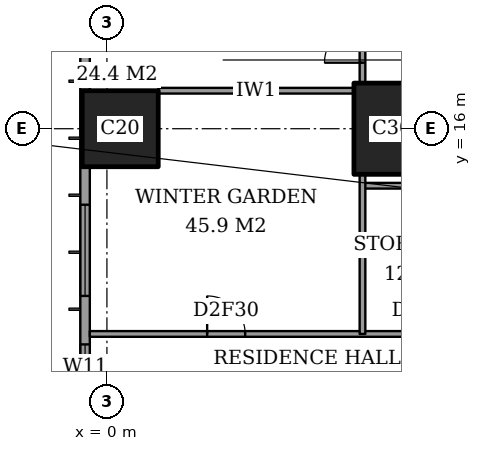
"""IFC4 building model, lengths in metres.
Left out: names, types, materials, properties, quantities, classifications, styles, units other than length and angle.
Written with IfcOpenShell. Run it as: python <this file> out.ifc"""

import sys

from ifc_helpers import new_model, si_unit, direction, frame, frame_2d, origin, origin_2d, place, context, subcontext, project, spatial, rectangle, extrude, element, fill, save


model = new_model("IFC4")
c1 = context("Model", 3, precision=1e-05, world=origin(), true_north=direction((0.0, 1.0)))
c2 = subcontext(c1, "Body", "Model", "MODEL_VIEW")
j1 = project(units=[si_unit("LENGTHUNIT", "METRE"), si_unit("PLANEANGLEUNIT", "RADIAN")], contexts=[c1])
p1 = place(None, origin())
s1 = spatial("IfcSite", under=j1, at=p1, CompositionType="ELEMENT")
p2 = place(p1, origin())
s2 = spatial("IfcBuilding", under=s1, at=p2, CompositionType="ELEMENT")
p3 = place(p2, frame((0.0, 0.0, 117.8)))
s3 = spatial("IfcBuildingStorey", under=s2, at=p3, CompositionType="ELEMENT", Elevation=117.8)
p4 = place(p3, frame((0.35, 16.0, 0.0), z_axis=(0.0, 0.0, 1.0), x_axis=(1.0, 0.0, 0.0)))
e1 = element("IfcColumn", 1, at=p4, inside=s3, PredefinedType="COLUMN", context=c2, shape_type="SweptSolid", body=[
    extrude(rectangle(XDim=2.0, YDim=2.0, at=origin_2d()), origin(), (0.0, 0.0, 1.0), 3.6),
])
p5 = place(p3, frame((8.0, 16.0, 0.0), z_axis=(0.0, 0.0, 1.0), x_axis=(1.0, 0.0, 0.0)))
e2 = element("IfcColumn", 2, at=p5, inside=s3, PredefinedType="COLUMN", context=c2, shape_type="SweptSolid", body=[
    extrude(rectangle(XDim=3.0, YDim=2.4, at=origin_2d()), origin(), (0.0, 0.0, 1.0), 3.6),
])
p6 = place(p3, frame((-0.575, 44.825, 0.0), z_axis=(0.0, 0.0, 1.0), x_axis=(0.0, -1.0, 0.0)))
e3 = element("IfcWall", 3, at=p6, inside=s3, PredefinedType="SOLIDWALL", context=c2, shape_type="SweptSolid", body=[
    extrude(rectangle(XDim=41.65, YDim=0.25, at=frame_2d((20.825, 0.0))), origin(), (0.0, 0.0, 1.0), 3.6),
])
p7 = place(p6, frame((0.775, 0.0, 0.4)))
e4 = element("IfcOpeningElement", 4, at=p7, cuts=e3, PredefinedType="OPENING", context=c2, shape_type="SweptSolid", body=[
    extrude(rectangle(XDim=2.4, YDim=2.2, at=frame_2d((1.2, 1.1))), frame((0.0, 0.135, 0.0), z_axis=(0.0, -1.0, 0.0), x_axis=(1.0, 0.0, 0.0)), (0.0, 0.0, 1.0), 0.27),
])
p8 = place(p6, frame((6.1, 0.0, 0.4)))
e5 = element("IfcOpeningElement", 5, at=p8, cuts=e3, PredefinedType="OPENING", context=c2, shape_type="SweptSolid", body=[
    extrude(rectangle(XDim=1.2, YDim=2.2, at=frame_2d((0.6, 1.1))), frame((0.0, 0.135, 0.0), z_axis=(0.0, -1.0, 0.0), x_axis=(1.0, 0.0, 0.0)), (0.0, 0.0, 1.0), 0.27),
])
p9 = place(p6, frame((8.225, 0.0, 0.4)))
e6 = element("IfcOpeningElement", 6, at=p9, cuts=e3, PredefinedType="OPENING", context=c2, shape_type="SweptSolid", body=[
    extrude(rectangle(XDim=2.4, YDim=2.2, at=frame_2d((1.2, 1.1))), frame((0.0, 0.135, 0.0), z_axis=(0.0, -1.0, 0.0), x_axis=(1.0, 0.0, 0.0)), (0.0, 0.0, 1.0), 0.27),
])
p10 = place(p6, frame((15.625, 0.0, 0.4)))
e7 = element("IfcOpeningElement", 7, at=p10, cuts=e3, PredefinedType="OPENING", context=c2, shape_type="SweptSolid", body=[
    extrude(rectangle(XDim=2.4, YDim=2.2, at=frame_2d((1.2, 1.1))), frame((0.0, 0.135, 0.0), z_axis=(0.0, -1.0, 0.0), x_axis=(1.0, 0.0, 0.0)), (0.0, 0.0, 1.0), 0.27),
])
p11 = place(p6, frame((23.625, 0.0, 0.4)))
e8 = element("IfcOpeningElement", 8, at=p11, cuts=e3, PredefinedType="OPENING", context=c2, shape_type="SweptSolid", body=[
    extrude(rectangle(XDim=2.4, YDim=2.2, at=frame_2d((1.2, 1.1))), frame((0.0, 0.135, 0.0), z_axis=(0.0, -1.0, 0.0), x_axis=(1.0, 0.0, 0.0)), (0.0, 0.0, 1.0), 0.27),
])
p12 = place(p6, frame((30.825, 0.0, 0.4)))
e9 = element("IfcOpeningElement", 9, at=p12, cuts=e3, PredefinedType="OPENING", context=c2, shape_type="SweptSolid", body=[
    extrude(rectangle(XDim=2.4, YDim=2.2, at=frame_2d((1.2, 1.1))), frame((0.0, 0.135, 0.0), z_axis=(0.0, -1.0, 0.0), x_axis=(1.0, 0.0, 0.0)), (0.0, 0.0, 1.0), 0.27),
])
p13 = place(p6, frame((34.5, 0.0, 0.4)))
e10 = element("IfcOpeningElement", 10, at=p13, cuts=e3, PredefinedType="OPENING", context=c2, shape_type="SweptSolid", body=[
    extrude(rectangle(XDim=1.2, YDim=2.2, at=frame_2d((0.6, 1.1))), frame((0.0, 0.135, 0.0), z_axis=(0.0, -1.0, 0.0), x_axis=(1.0, 0.0, 0.0)), (0.0, 0.0, 1.0), 0.27),
])
p14 = place(p6, frame((38.475, 0.0, 0.4)))
e11 = element("IfcOpeningElement", 11, at=p14, cuts=e3, PredefinedType="OPENING", context=c2, shape_type="SweptSolid", body=[
    extrude(rectangle(XDim=2.4, YDim=2.2, at=frame_2d((1.2, 1.1))), frame((0.0, 0.135, 0.0), z_axis=(0.0, -1.0, 0.0), x_axis=(1.0, 0.0, 0.0)), (0.0, 0.0, 1.0), 0.27),
])
p15 = place(p3, frame((-0.45, 10.6, 0.0), z_axis=(0.0, 0.0, 1.0), x_axis=(1.0, 0.0, 0.0)))
e12 = element("IfcWall", 12, at=p15, inside=s3, PredefinedType="PARTITIONING", context=c2, shape_type="SweptSolid", body=[
    extrude(rectangle(XDim=25.011, YDim=0.15, at=frame_2d((12.505, 0.0))), origin(), (0.0, 0.0, 1.0), 3.35),
])
p16 = place(p15, frame((13.25, 0.0, 0.0)))
e13 = element("IfcOpeningElement", 13, at=p16, cuts=e12, PredefinedType="OPENING", context=c2, shape_type="SweptSolid", body=[
    extrude(rectangle(XDim=1.0, YDim=2.1, at=frame_2d((0.5, 1.05))), frame((0.0, 0.085, 0.0), z_axis=(0.0, -1.0, 0.0), x_axis=(1.0, 0.0, 0.0)), (0.0, 0.0, 1.0), 0.17),
])
p17 = place(p15, frame((3.087, 0.0, 0.0)))
e14 = element("IfcOpeningElement", 14, at=p17, cuts=e12, PredefinedType="OPENING", context=c2, shape_type="SweptSolid", body=[
    extrude(rectangle(XDim=1.0, YDim=2.1, at=frame_2d((0.5, 1.05))), frame((0.0, 0.085, 0.0), z_axis=(0.0, -1.0, 0.0), x_axis=(1.0, 0.0, 0.0)), (0.0, 0.0, 1.0), 0.17),
])
p18 = place(p15, frame((8.363, 0.0, 0.0)))
e15 = element("IfcOpeningElement", 15, at=p18, cuts=e12, PredefinedType="OPENING", context=c2, shape_type="SweptSolid", body=[
    extrude(rectangle(XDim=0.9, YDim=2.1, at=frame_2d((0.45, 1.05))), frame((0.0, 0.085, 0.0), z_axis=(0.0, -1.0, 0.0), x_axis=(1.0, 0.0, 0.0)), (0.0, 0.0, 1.0), 0.17),
])
p19 = place(p15, frame((11.05, 0.0, 0.0)))
e16 = element("IfcOpeningElement", 16, at=p19, cuts=e12, PredefinedType="OPENING", context=c2, shape_type="SweptSolid", body=[
    extrude(rectangle(XDim=1.0, YDim=2.1, at=frame_2d((0.5, 1.05))), frame((0.0, 0.085, 0.0), z_axis=(0.0, -1.0, 0.0), x_axis=(1.0, 0.0, 0.0)), (0.0, 0.0, 1.0), 0.17),
])
p20 = place(p15, frame((16.15, 0.0, 0.0)))
e17 = element("IfcOpeningElement", 17, at=p20, cuts=e12, PredefinedType="OPENING", context=c2, shape_type="SweptSolid", body=[
    extrude(rectangle(XDim=1.0, YDim=2.1, at=frame_2d((0.5, 1.05))), frame((0.0, 0.085, 0.0), z_axis=(0.0, -1.0, 0.0), x_axis=(1.0, 0.0, 0.0)), (0.0, 0.0, 1.0), 0.17),
])
p21 = place(p15, frame((21.175, 0.0, 0.0)))
e18 = element("IfcOpeningElement", 18, at=p21, cuts=e12, PredefinedType="OPENING", context=c2, shape_type="SweptSolid", body=[
    extrude(rectangle(XDim=1.0, YDim=2.1, at=frame_2d((0.5, 1.05))), frame((0.0, 0.085, 0.0), z_axis=(0.0, -1.0, 0.0), x_axis=(1.0, 0.0, 0.0)), (0.0, 0.0, 1.0), 0.17),
])
p22 = place(p3, frame((6.725, 14.5, 0.0), z_axis=(0.0, 0.0, 1.0), x_axis=(1.0, 0.0, 0.0)))
e19 = element("IfcWall", 19, at=p22, inside=s3, PredefinedType="PARTITIONING", context=c2, shape_type="SweptSolid", body=[
    extrude(rectangle(XDim=3.275, YDim=0.15, at=frame_2d((1.637, 0.0))), origin(), (0.0, 0.0, 1.0), 3.35),
])
p23 = place(p3, frame((1.35, 17.0, 0.0), z_axis=(0.0, 0.0, 1.0), x_axis=(1.0, 0.0, 0.0)))
e20 = element("IfcWall", 20, at=p23, inside=s3, PredefinedType="PARTITIONING", context=c2, shape_type="SweptSolid", body=[
    extrude(rectangle(XDim=5.15, YDim=0.15, at=frame_2d((2.575, 0.0))), origin(), (0.0, 0.0, 1.0), 3.35),
])
p24 = place(p3, frame((6.725, 10.6, 0.0), z_axis=(0.0, 0.0, 1.0), x_axis=(0.0, 1.0, 0.0)))
e21 = element("IfcWall", 21, at=p24, inside=s3, PredefinedType="PARTITIONING", context=c2, shape_type="SweptSolid", body=[
    extrude(rectangle(XDim=4.2, YDim=0.15, at=frame_2d((2.1, 0.0))), origin(), (0.0, 0.0, 1.0), 3.35),
])
p25 = place(p3, frame((6.725, 17.2, 0.0), z_axis=(0.0, 0.0, 1.0), x_axis=(0.0, 1.0, 0.0)))
e22 = element("IfcWall", 22, at=p25, inside=s3, PredefinedType="PARTITIONING", context=c2, shape_type="SweptSolid", body=[
    extrude(rectangle(XDim=2.45, YDim=0.15, at=frame_2d((1.225, 0.0))), origin(), (0.0, 0.0, 1.0), 3.35),
])
p26 = place(p25, frame((0.538, 0.0, 0.0)))
e23 = element("IfcOpeningElement", 23, at=p26, cuts=e22, PredefinedType="OPENING", context=c2, shape_type="SweptSolid", body=[
    extrude(rectangle(XDim=1.0, YDim=2.1, at=frame_2d((0.5, 1.05))), frame((0.0, 0.085, 0.0), z_axis=(0.0, -1.0, 0.0), x_axis=(1.0, 0.0, 0.0)), (0.0, 0.0, 1.0), 0.17),
])
p27 = place(p12, origin())
e24 = element("IfcWindow", 24, at=p27, inside=s3, PartitioningType="SINGLE_PANEL", PredefinedType="WINDOW", context=c2, shape_type="SweptSolid", body=[
    extrude(rectangle(XDim=2.4, YDim=2.2, at=frame_2d((1.2, 1.1))), frame((0.0, 0.03, 0.0), z_axis=(0.0, -1.0, 0.0), x_axis=(1.0, 0.0, 0.0)), (0.0, 0.0, 1.0), 0.06),
])
fill(e9, e24)
p28 = place(p13, origin())
e25 = element("IfcWindow", 25, at=p28, inside=s3, PartitioningType="SINGLE_PANEL", PredefinedType="WINDOW", context=c2, shape_type="SweptSolid", body=[
    extrude(rectangle(XDim=1.2, YDim=2.2, at=frame_2d((0.6, 1.1))), frame((0.0, 0.03, 0.0), z_axis=(0.0, -1.0, 0.0), x_axis=(1.0, 0.0, 0.0)), (0.0, 0.0, 1.0), 0.06),
])
fill(e10, e25)
p29 = place(p17, origin())
e26 = element("IfcDoor", 26, at=p29, inside=s3, OperationType="SINGLE_SWING_RIGHT", PredefinedType="DOOR", context=c2, shape_type="SweptSolid", body=[
    extrude(rectangle(XDim=1.0, YDim=2.1, at=frame_2d((0.5, 1.05))), frame((0.0, 0.025, 0.0), z_axis=(0.0, -1.0, 0.0), x_axis=(1.0, 0.0, 0.0)), (0.0, 0.0, 1.0), 0.05),
])
fill(e14, e26)
p30 = place(p26, origin())
e27 = element("IfcDoor", 27, at=p30, inside=s3, OperationType="SINGLE_SWING_RIGHT", PredefinedType="DOOR", context=c2, shape_type="SweptSolid", body=[
    extrude(rectangle(XDim=1.0, YDim=2.1, at=frame_2d((0.5, 1.05))), frame((0.0, 0.025, 0.0), z_axis=(0.0, -1.0, 0.0), x_axis=(1.0, 0.0, 0.0)), (0.0, 0.0, 1.0), 0.05),
])
fill(e23, e27)
save(model, sys.argv[1])
